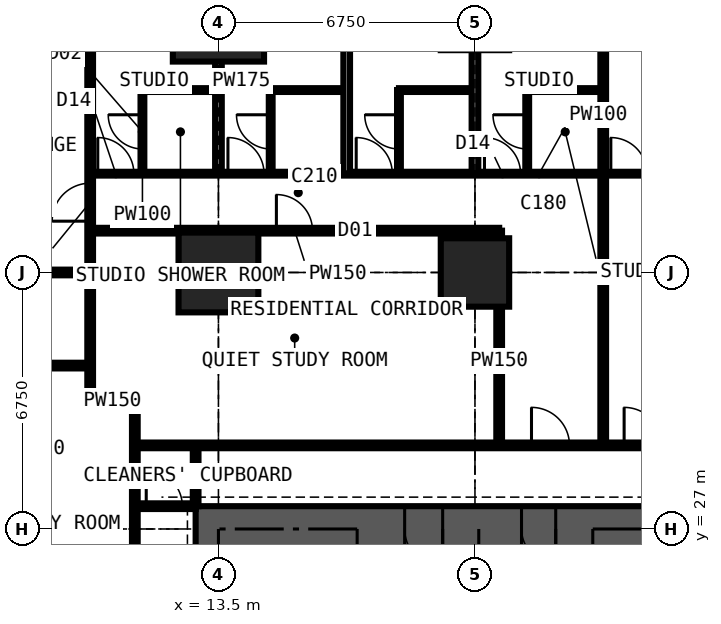
"""IFC4 building model, lengths in metres.
Left out: names, types, materials, properties, quantities, classifications, styles, units other than length and angle.
Written with IfcOpenShell. Run it as: python <this file> out.ifc"""

import sys

from ifc_helpers import new_model, si_unit, direction, frame, frame_2d, origin, origin_2d, place, context, subcontext, project, spatial, rectangle, extrude, element, fill, save


model = new_model("IFC4")
c1 = context("Model", 3, precision=1e-05, world=origin(), true_north=direction((0.0, 1.0)))
c2 = subcontext(c1, "Body", "Model", "MODEL_VIEW")
j1 = project(units=[si_unit("LENGTHUNIT", "METRE"), si_unit("PLANEANGLEUNIT", "RADIAN")], contexts=[c1])
p1 = place(None, origin())
s1 = spatial("IfcSite", under=j1, at=p1, CompositionType="ELEMENT")
p2 = place(p1, origin())
s2 = spatial("IfcBuilding", under=s1, at=p2, CompositionType="ELEMENT")
p3 = place(p2, frame((0.0, 0.0, 72.0)))
s3 = spatial("IfcBuildingStorey", under=s2, at=p3, CompositionType="ELEMENT", Elevation=72.0)
p4 = place(p3, frame((13.5, 33.75, 0.0), z_axis=(0.0, 0.0, 1.0), x_axis=(1.0, 0.0, 0.0)))
e1 = element("IfcColumn", 1, at=p4, inside=s3, PredefinedType="COLUMN", context=c2, shape_type="SweptSolid", body=[
    extrude(rectangle(XDim=2.1, YDim=2.1, at=origin_2d()), origin(), (0.0, 0.0, 1.0), 3.6),
])
p5 = place(p3, frame((13.5, 40.5, 0.0), z_axis=(0.0, 0.0, 1.0), x_axis=(1.0, 0.0, 0.0)))
e2 = element("IfcColumn", 2, at=p5, inside=s3, PredefinedType="COLUMN", context=c2, shape_type="SweptSolid", body=[
    extrude(rectangle(XDim=2.4, YDim=2.4, at=origin_2d()), origin(), (0.0, 0.0, 1.0), 3.6),
])
p6 = place(p3, frame((20.25, 33.75, 0.0), z_axis=(0.0, 0.0, 1.0), x_axis=(1.0, 0.0, 0.0)))
e3 = element("IfcColumn", 3, at=p6, inside=s3, PredefinedType="COLUMN", context=c2, shape_type="SweptSolid", body=[
    extrude(rectangle(XDim=1.8, YDim=1.8, at=origin_2d()), origin(), (0.0, 0.0, 1.0), 3.6),
])
p7 = place(p3, frame((27.6, 27.0, 0.0), z_axis=(0.0, 0.0, 1.0), x_axis=(-1.0, 0.0, 0.0)))
e4 = element("IfcWall", 4, at=p7, inside=s3, PredefinedType="SHEAR", context=c2, shape_type="SweptSolid", body=[
    extrude(rectangle(XDim=14.7, YDim=1.2, at=frame_2d((7.35, 0.0))), origin(), (0.0, 0.0, 1.0), 3.6),
])
p8 = place(p7, frame((5.225, 0.0, 0.0)))
e5 = element("IfcOpeningElement", 5, at=p8, cuts=e4, PredefinedType="OPENING", context=c2, shape_type="SweptSolid", body=[
    extrude(rectangle(XDim=0.9, YDim=2.2, at=frame_2d((0.45, 1.1))), frame((0.0, 0.61, 0.0), z_axis=(0.0, -1.0, 0.0), x_axis=(1.0, 0.0, 0.0)), (0.0, 0.0, 1.0), 1.22),
])
p9 = place(p7, frame((8.2, 0.0, 0.0)))
e6 = element("IfcOpeningElement", 6, at=p9, cuts=e4, PredefinedType="OPENING", context=c2, shape_type="SweptSolid", body=[
    extrude(rectangle(XDim=1.0, YDim=2.2, at=frame_2d((0.5, 1.1))), frame((0.0, 0.61, 0.0), z_axis=(0.0, -1.0, 0.0), x_axis=(1.0, 0.0, 0.0)), (0.0, 0.0, 1.0), 1.22),
])
p10 = place(p3, frame((-0.734, 33.75, 0.0), z_axis=(0.0, 0.0, 1.0), x_axis=(1.0, 0.0, 0.0)))
e7 = element("IfcWall", 7, at=p10, inside=s3, PredefinedType="PARTITIONING", context=c2, shape_type="SweptSolid", body=[
    extrude(rectangle(XDim=10.859, YDim=0.15, at=frame_2d((5.429, 0.0))), origin(), (0.0, 0.0, 1.0), 2.802),
])
p11 = place(p3, frame((5.65, 31.3, 0.0), z_axis=(0.0, 0.0, 1.0), x_axis=(1.0, 0.0, 0.0)))
e8 = element("IfcWall", 8, at=p11, inside=s3, PredefinedType="PARTITIONING", context=c2, shape_type="SweptSolid", body=[
    extrude(rectangle(XDim=4.475, YDim=0.15, at=frame_2d((2.238, 0.0))), origin(), (0.0, 0.0, 1.0), 3.3),
])
p12 = place(p3, frame((10.125, 30.375, 0.0), z_axis=(0.0, 0.0, 1.0), x_axis=(0.0, 1.0, 0.0)))
e9 = element("IfcWall", 9, at=p12, inside=s3, PredefinedType="PARTITIONING", context=c2, shape_type="SweptSolid", body=[
    extrude(rectangle(XDim=10.859, YDim=0.15, at=frame_2d((5.429, 0.0))), origin(), (0.0, 0.0, 1.0), 3.3),
])
p13 = place(p12, frame((4.725, 0.0, 0.0)))
e10 = element("IfcOpeningElement", 10, at=p13, cuts=e9, PredefinedType="OPENING", context=c2, shape_type="SweptSolid", body=[
    extrude(rectangle(XDim=1.0, YDim=2.2, at=frame_2d((0.5, 1.1))), frame((0.0, 0.085, 0.0), z_axis=(0.0, -1.0, 0.0), x_axis=(1.0, 0.0, 0.0)), (0.0, 0.0, 1.0), 0.17),
])
p14 = place(p3, frame((10.125, 30.375, 0.0), z_axis=(0.0, 0.0, 1.0), x_axis=(1.0, 0.0, 0.0)))
e11 = element("IfcWall", 11, at=p14, inside=s3, PredefinedType="PARTITIONING", context=c2, shape_type="SweptSolid", body=[
    extrude(rectangle(XDim=1.175, YDim=0.15, at=frame_2d((0.587, 0.0))), origin(), (0.0, 0.0, 1.0), 3.3),
])
p15 = place(p3, frame((10.125, 34.85, 0.0), z_axis=(0.0, 0.0, 1.0), x_axis=(1.0, 0.0, 0.0)))
e12 = element("IfcWall", 12, at=p15, inside=s3, PredefinedType="PARTITIONING", context=c2, shape_type="SweptSolid", body=[
    extrude(rectangle(XDim=10.762, YDim=0.15, at=frame_2d((5.381, 0.0))), origin(), (0.0, 0.0, 1.0), 3.3),
])
p16 = place(p15, frame((4.9, 0.0, 0.0)))
e13 = element("IfcOpeningElement", 13, at=p16, cuts=e12, PredefinedType="OPENING", context=c2, shape_type="SweptSolid", body=[
    extrude(rectangle(XDim=0.95, YDim=2.2, at=frame_2d((0.475, 1.1))), frame((0.0, 0.085, 0.0), z_axis=(0.0, -1.0, 0.0), x_axis=(1.0, 0.0, 0.0)), (0.0, 0.0, 1.0), 0.17),
])
p17 = place(p3, frame((10.125, 36.35, 0.0), z_axis=(0.0, 0.0, 1.0), x_axis=(1.0, 0.0, 0.0)))
e14 = element("IfcWall", 14, at=p17, inside=s3, PredefinedType="PARTITIONING", context=c2, shape_type="SweptSolid", body=[
    extrude(rectangle(XDim=23.625, YDim=0.1, at=frame_2d((11.812, 0.0))), origin(), (0.0, 0.0, 1.0), 3.3),
])
p18 = place(p17, frame((21.45, 0.0, 0.0)))
e15 = element("IfcOpeningElement", 15, at=p18, cuts=e14, PredefinedType="OPENING", context=c2, shape_type="SweptSolid", body=[
    extrude(rectangle(XDim=1.0, YDim=2.2, at=frame_2d((0.5, 1.1))), frame((0.0, 0.06, 0.0), z_axis=(0.0, -1.0, 0.0), x_axis=(1.0, 0.0, 0.0)), (0.0, 0.0, 1.0), 0.12),
])
p19 = place(p17, frame((17.125, 0.0, 0.0)))
e16 = element("IfcOpeningElement", 16, at=p19, cuts=e14, PredefinedType="OPENING", context=c2, shape_type="SweptSolid", body=[
    extrude(rectangle(XDim=0.95, YDim=2.2, at=frame_2d((0.475, 1.1))), frame((0.0, 0.06, 0.0), z_axis=(0.0, -1.0, 0.0), x_axis=(1.0, 0.0, 0.0)), (0.0, 0.0, 1.0), 0.12),
])
p20 = place(p17, frame((13.7, 0.0, 0.0)))
e17 = element("IfcOpeningElement", 17, at=p20, cuts=e14, PredefinedType="OPENING", context=c2, shape_type="SweptSolid", body=[
    extrude(rectangle(XDim=0.95, YDim=2.2, at=frame_2d((0.475, 1.1))), frame((0.0, 0.06, 0.0), z_axis=(0.0, -1.0, 0.0), x_axis=(1.0, 0.0, 0.0)), (0.0, 0.0, 1.0), 0.12),
])
p21 = place(p17, frame((0.2, 0.0, 0.0)))
e18 = element("IfcOpeningElement", 18, at=p21, cuts=e14, PredefinedType="OPENING", context=c2, shape_type="SweptSolid", body=[
    extrude(rectangle(XDim=0.95, YDim=2.2, at=frame_2d((0.475, 1.1))), frame((0.0, 0.06, 0.0), z_axis=(0.0, -1.0, 0.0), x_axis=(1.0, 0.0, 0.0)), (0.0, 0.0, 1.0), 0.12),
])
p22 = place(p17, frame((3.625, 0.0, 0.0)))
e19 = element("IfcOpeningElement", 19, at=p22, cuts=e14, PredefinedType="OPENING", context=c2, shape_type="SweptSolid", body=[
    extrude(rectangle(XDim=0.95, YDim=2.2, at=frame_2d((0.475, 1.1))), frame((0.0, 0.06, 0.0), z_axis=(0.0, -1.0, 0.0), x_axis=(1.0, 0.0, 0.0)), (0.0, 0.0, 1.0), 0.12),
])
p23 = place(p17, frame((7.0, 0.0, 0.0)))
e20 = element("IfcOpeningElement", 20, at=p23, cuts=e14, PredefinedType="OPENING", context=c2, shape_type="SweptSolid", body=[
    extrude(rectangle(XDim=0.95, YDim=2.2, at=frame_2d((0.475, 1.1))), frame((0.0, 0.06, 0.0), z_axis=(0.0, -1.0, 0.0), x_axis=(1.0, 0.0, 0.0)), (0.0, 0.0, 1.0), 0.12),
])
p24 = place(p17, frame((10.375, 0.0, 0.0)))
e21 = element("IfcOpeningElement", 21, at=p24, cuts=e14, PredefinedType="OPENING", context=c2, shape_type="SweptSolid", body=[
    extrude(rectangle(XDim=0.95, YDim=2.2, at=frame_2d((0.475, 1.1))), frame((0.0, 0.06, 0.0), z_axis=(0.0, -1.0, 0.0), x_axis=(1.0, 0.0, 0.0)), (0.0, 0.0, 1.0), 0.12),
])
p25 = place(p3, frame((11.3, 11.3, 0.0), z_axis=(0.0, 0.0, 1.0), x_axis=(0.0, 1.0, 0.0)))
e22 = element("IfcWall", 22, at=p25, inside=s3, PredefinedType="PARTITIONING", context=c2, shape_type="SweptSolid", body=[
    extrude(rectangle(XDim=19.075, YDim=0.15, at=frame_2d((9.538, 0.0))), origin(), (0.0, 0.0, 1.0), 3.3),
])
p26 = place(p25, frame((10.137, 0.0, 0.0)))
e23 = element("IfcOpeningElement", 23, at=p26, cuts=e22, PredefinedType="OPENING", context=c2, shape_type="SweptSolid", body=[
    extrude(rectangle(XDim=1.0, YDim=2.2, at=frame_2d((0.5, 1.1))), frame((0.0, 0.085, 0.0), z_axis=(0.0, -1.0, 0.0), x_axis=(1.0, 0.0, 0.0)), (0.0, 0.0, 1.0), 0.17),
])
p27 = place(p3, frame((11.3, 27.6, 0.0), z_axis=(0.0, 0.0, 1.0), x_axis=(1.0, 0.0, 0.0)))
e24 = element("IfcWall", 24, at=p27, inside=s3, PredefinedType="PARTITIONING", context=c2, shape_type="SweptSolid", body=[
    extrude(rectangle(XDim=1.6, YDim=0.15, at=frame_2d((0.8, 0.0))), origin(), (0.0, 0.0, 1.0), 2.7),
])
p28 = place(p27, frame((0.3, 0.0, 0.0)))
e25 = element("IfcOpeningElement", 25, at=p28, cuts=e24, PredefinedType="OPENING", context=c2, shape_type="SweptSolid", body=[
    extrude(rectangle(XDim=0.95, YDim=2.2, at=frame_2d((0.475, 1.1))), frame((0.0, 0.085, 0.0), z_axis=(0.0, -1.0, 0.0), x_axis=(1.0, 0.0, 0.0)), (0.0, 0.0, 1.0), 0.17),
])
p29 = place(p3, frame((11.3, 29.2, 0.0), z_axis=(0.0, 0.0, 1.0), x_axis=(1.0, 0.0, 0.0)))
e26 = element("IfcWall", 26, at=p29, inside=s3, PredefinedType="PARTITIONING", context=c2, shape_type="SweptSolid", body=[
    extrude(rectangle(XDim=19.075, YDim=0.15, at=frame_2d((9.538, 0.0))), origin(), (0.0, 0.0, 1.0), 3.3),
])
p30 = place(p29, frame((12.875, 0.0, 0.0)))
e27 = element("IfcOpeningElement", 27, at=p30, cuts=e26, PredefinedType="OPENING", context=c2, shape_type="SweptSolid", body=[
    extrude(rectangle(XDim=1.0, YDim=2.2, at=frame_2d((0.5, 1.1))), frame((0.0, 0.085, 0.0), z_axis=(0.0, -1.0, 0.0), x_axis=(1.0, 0.0, 0.0)), (0.0, 0.0, 1.0), 0.17),
])
p31 = place(p29, frame((10.438, 0.0, 0.0)))
e28 = element("IfcOpeningElement", 28, at=p31, cuts=e26, PredefinedType="OPENING", context=c2, shape_type="SweptSolid", body=[
    extrude(rectangle(XDim=1.0, YDim=2.2, at=frame_2d((0.5, 1.1))), frame((0.0, 0.085, 0.0), z_axis=(0.0, -1.0, 0.0), x_axis=(1.0, 0.0, 0.0)), (0.0, 0.0, 1.0), 0.17),
])
p32 = place(p29, frame((15.675, 0.0, 0.0)))
e29 = element("IfcOpeningElement", 29, at=p32, cuts=e26, PredefinedType="OPENING", context=c2, shape_type="SweptSolid", body=[
    extrude(rectangle(XDim=0.95, YDim=2.2, at=frame_2d((0.475, 1.1))), frame((0.0, 0.085, 0.0), z_axis=(0.0, -1.0, 0.0), x_axis=(1.0, 0.0, 0.0)), (0.0, 0.0, 1.0), 0.17),
])
p33 = place(p3, frame((11.5, 36.35, 0.0), z_axis=(0.0, 0.0, 1.0), x_axis=(0.0, 1.0, 0.0)))
e30 = element("IfcWall", 30, at=p33, inside=s3, PredefinedType="PARTITIONING", context=c2, shape_type="SweptSolid", body=[
    extrude(rectangle(XDim=2.2, YDim=0.1, at=frame_2d((1.1, 0.0))), origin(), (0.0, 0.0, 1.0), 3.3),
])
p34 = place(p33, frame((0.65, 0.0, 0.0)))
e31 = element("IfcOpeningElement", 31, at=p34, cuts=e30, PredefinedType="OPENING", context=c2, shape_type="SweptSolid", body=[
    extrude(rectangle(XDim=0.9, YDim=2.2, at=frame_2d((0.45, 1.1))), frame((0.0, 0.06, 0.0), z_axis=(0.0, -1.0, 0.0), x_axis=(1.0, 0.0, 0.0)), (0.0, 0.0, 1.0), 0.12),
])
p35 = place(p3, frame((11.5, 38.55, 0.0), z_axis=(0.0, 0.0, 1.0), x_axis=(1.0, 0.0, 0.0)))
e32 = element("IfcWall", 32, at=p35, inside=s3, PredefinedType="PARTITIONING", context=c2, shape_type="SweptSolid", body=[
    extrude(rectangle(XDim=2.0, YDim=0.1, at=frame_2d((1.0, 0.0))), origin(), (0.0, 0.0, 1.0), 3.3),
])
p36 = place(p3, frame((12.9, 27.6, 0.0), z_axis=(0.0, 0.0, 1.0), x_axis=(0.0, 1.0, 0.0)))
e33 = element("IfcWall", 33, at=p36, inside=s3, PredefinedType="PARTITIONING", context=c2, shape_type="SweptSolid", body=[
    extrude(rectangle(XDim=1.6, YDim=0.15, at=frame_2d((0.8, 0.0))), origin(), (0.0, 0.0, 1.0), 3.3),
])
p37 = place(p3, frame((13.5, 36.35, 0.0), z_axis=(0.0, 0.0, 1.0), x_axis=(0.0, 1.0, 0.0)))
e34 = element("IfcWall", 34, at=p37, inside=s3, PredefinedType="PARTITIONING", context=c2, shape_type="SweptSolid", body=[
    extrude(rectangle(XDim=4.884, YDim=0.175, at=frame_2d((2.442, 0.0))), origin(), (0.0, 0.0, 1.0), 2.802),
])
p38 = place(p3, frame((14.875, 36.35, 0.0), z_axis=(0.0, 0.0, 1.0), x_axis=(0.0, 1.0, 0.0)))
e35 = element("IfcWall", 35, at=p38, inside=s3, PredefinedType="PARTITIONING", context=c2, shape_type="SweptSolid", body=[
    extrude(rectangle(XDim=2.2, YDim=0.1, at=frame_2d((1.1, 0.0))), origin(), (0.0, 0.0, 1.0), 3.3),
])
p39 = place(p38, frame((0.65, 0.0, 0.0)))
e36 = element("IfcOpeningElement", 36, at=p39, cuts=e35, PredefinedType="OPENING", context=c2, shape_type="SweptSolid", body=[
    extrude(rectangle(XDim=0.9, YDim=2.2, at=frame_2d((0.45, 1.1))), frame((0.0, 0.06, 0.0), z_axis=(0.0, -1.0, 0.0), x_axis=(1.0, 0.0, 0.0)), (0.0, 0.0, 1.0), 0.12),
])
p40 = place(p3, frame((14.875, 38.55, 0.0), z_axis=(0.0, 0.0, 1.0), x_axis=(1.0, 0.0, 0.0)))
e37 = element("IfcWall", 37, at=p40, inside=s3, PredefinedType="PARTITIONING", context=c2, shape_type="SweptSolid", body=[
    extrude(rectangle(XDim=2.0, YDim=0.1, at=frame_2d((1.0, 0.0))), origin(), (0.0, 0.0, 1.0), 3.3),
])
p41 = place(p3, frame((16.875, 36.35, 0.0), z_axis=(0.0, 0.0, 1.0), x_axis=(0.0, 1.0, 0.0)))
e38 = element("IfcWall", 38, at=p41, inside=s3, PredefinedType="PARTITIONING", context=c2, shape_type="SweptSolid", body=[
    extrude(rectangle(XDim=4.884, YDim=0.175, at=frame_2d((2.442, 0.0))), origin(), (0.0, 0.0, 1.0), 3.3),
])
p42 = place(p3, frame((18.25, 36.35, 0.0), z_axis=(0.0, 0.0, 1.0), x_axis=(0.0, 1.0, 0.0)))
e39 = element("IfcWall", 39, at=p42, inside=s3, PredefinedType="PARTITIONING", context=c2, shape_type="SweptSolid", body=[
    extrude(rectangle(XDim=2.2, YDim=0.1, at=frame_2d((1.1, 0.0))), origin(), (0.0, 0.0, 1.0), 3.3),
])
p43 = place(p42, frame((0.65, 0.0, 0.0)))
e40 = element("IfcOpeningElement", 40, at=p43, cuts=e39, PredefinedType="OPENING", context=c2, shape_type="SweptSolid", body=[
    extrude(rectangle(XDim=0.9, YDim=2.2, at=frame_2d((0.45, 1.1))), frame((0.0, 0.06, 0.0), z_axis=(0.0, -1.0, 0.0), x_axis=(1.0, 0.0, 0.0)), (0.0, 0.0, 1.0), 0.12),
])
p44 = place(p3, frame((18.25, 38.55, 0.0), z_axis=(0.0, 0.0, 1.0), x_axis=(1.0, 0.0, 0.0)))
e41 = element("IfcWall", 41, at=p44, inside=s3, PredefinedType="PARTITIONING", context=c2, shape_type="SweptSolid", body=[
    extrude(rectangle(XDim=2.0, YDim=0.1, at=frame_2d((1.0, 0.0))), origin(), (0.0, 0.0, 1.0), 3.3),
])
p45 = place(p3, frame((20.25, 36.35, 0.0), z_axis=(0.0, 0.0, 1.0), x_axis=(0.0, 1.0, 0.0)))
e42 = element("IfcWall", 42, at=p45, inside=s3, PredefinedType="PARTITIONING", context=c2, shape_type="SweptSolid", body=[
    extrude(rectangle(XDim=4.884, YDim=0.175, at=frame_2d((2.442, 0.0))), origin(), (0.0, 0.0, 1.0), 2.731),
])
p46 = place(p3, frame((20.887, 29.2, 0.0), z_axis=(0.0, 0.0, 1.0), x_axis=(0.0, 1.0, 0.0)))
e43 = element("IfcWall", 43, at=p46, inside=s3, PredefinedType="PARTITIONING", context=c2, shape_type="SweptSolid", body=[
    extrude(rectangle(XDim=5.65, YDim=0.15, at=frame_2d((2.825, 0.0))), origin(), (0.0, 0.0, 1.0), 3.3),
])
p47 = place(p3, frame((21.625, 36.35, 0.0), z_axis=(0.0, 0.0, 1.0), x_axis=(0.0, 1.0, 0.0)))
e44 = element("IfcWall", 44, at=p47, inside=s3, PredefinedType="PARTITIONING", context=c2, shape_type="SweptSolid", body=[
    extrude(rectangle(XDim=2.2, YDim=0.1, at=frame_2d((1.1, 0.0))), origin(), (0.0, 0.0, 1.0), 3.3),
])
p48 = place(p47, frame((0.65, 0.0, 0.0)))
e45 = element("IfcOpeningElement", 45, at=p48, cuts=e44, PredefinedType="OPENING", context=c2, shape_type="SweptSolid", body=[
    extrude(rectangle(XDim=0.9, YDim=2.2, at=frame_2d((0.45, 1.1))), frame((0.0, 0.06, 0.0), z_axis=(0.0, -1.0, 0.0), x_axis=(1.0, 0.0, 0.0)), (0.0, 0.0, 1.0), 0.12),
])
p49 = place(p3, frame((21.625, 38.55, 0.0), z_axis=(0.0, 0.0, 1.0), x_axis=(1.0, 0.0, 0.0)))
e46 = element("IfcWall", 46, at=p49, inside=s3, PredefinedType="PARTITIONING", context=c2, shape_type="SweptSolid", body=[
    extrude(rectangle(XDim=2.0, YDim=0.1, at=frame_2d((1.0, 0.0))), origin(), (0.0, 0.0, 1.0), 3.3),
])
p50 = place(p3, frame((23.625, 29.2, 0.0), z_axis=(0.0, 0.0, 1.0), x_axis=(0.0, 1.0, 0.0)))
e47 = element("IfcWall", 47, at=p50, inside=s3, PredefinedType="PARTITIONING", context=c2, shape_type="SweptSolid", body=[
    extrude(rectangle(XDim=12.034, YDim=0.15, at=frame_2d((6.017, 0.0))), origin(), (0.0, 0.0, 1.0), 3.3),
])
p51 = place(p8, origin())
e48 = element("IfcDoor", 48, at=p51, inside=s3, OperationType="SINGLE_SWING_LEFT", PredefinedType="DOOR", context=c2, shape_type="SweptSolid", body=[
    extrude(rectangle(XDim=0.9, YDim=2.2, at=frame_2d((0.45, 1.1))), frame((0.0, 0.4, 0.0), z_axis=(0.0, -1.0, 0.0), x_axis=(1.0, 0.0, 0.0)), (0.0, 0.0, 1.0), 0.8),
])
fill(e5, e48)
p52 = place(p9, origin())
e49 = element("IfcDoor", 49, at=p52, inside=s3, OperationType="SINGLE_SWING_LEFT", PredefinedType="DOOR", context=c2, shape_type="SweptSolid", body=[
    extrude(rectangle(XDim=1.0, YDim=2.2, at=frame_2d((0.5, 1.1))), frame((0.0, 0.025, 0.0), z_axis=(0.0, -1.0, 0.0), x_axis=(1.0, 0.0, 0.0)), (0.0, 0.0, 1.0), 0.05),
])
fill(e6, e49)
p53 = place(p28, origin())
e50 = element("IfcDoor", 50, at=p53, inside=s3, OperationType="SINGLE_SWING_LEFT", PredefinedType="DOOR", context=c2, shape_type="SweptSolid", body=[
    extrude(rectangle(XDim=0.95, YDim=2.2, at=frame_2d((0.475, 1.1))), frame((0.0, 0.025, 0.0), z_axis=(0.0, -1.0, 0.0), x_axis=(1.0, 0.0, 0.0)), (0.0, 0.0, 1.0), 0.05),
])
fill(e25, e50)
p54 = place(p20, origin())
e51 = element("IfcDoor", 51, at=p54, inside=s3, OperationType="SINGLE_SWING_LEFT", PredefinedType="DOOR", context=c2, shape_type="SweptSolid", body=[
    extrude(rectangle(XDim=0.95, YDim=2.2, at=frame_2d((0.475, 1.1))), frame((0.0, 0.025, 0.0), z_axis=(0.0, -1.0, 0.0), x_axis=(1.0, 0.0, 0.0)), (0.0, 0.0, 1.0), 0.05),
])
fill(e17, e51)
p55 = place(p30, origin())
e52 = element("IfcDoor", 52, at=p55, inside=s3, OperationType="SINGLE_SWING_LEFT", PredefinedType="DOOR", context=c2, shape_type="SweptSolid", body=[
    extrude(rectangle(XDim=1.0, YDim=2.2, at=frame_2d((0.5, 1.1))), frame((0.0, 0.025, 0.0), z_axis=(0.0, -1.0, 0.0), x_axis=(1.0, 0.0, 0.0)), (0.0, 0.0, 1.0), 0.05),
])
fill(e27, e52)
p56 = place(p21, origin())
e53 = element("IfcDoor", 53, at=p56, inside=s3, OperationType="SINGLE_SWING_LEFT", PredefinedType="DOOR", context=c2, shape_type="SweptSolid", body=[
    extrude(rectangle(XDim=0.95, YDim=2.2, at=frame_2d((0.475, 1.1))), frame((0.0, 0.025, 0.0), z_axis=(0.0, -1.0, 0.0), x_axis=(1.0, 0.0, 0.0)), (0.0, 0.0, 1.0), 0.05),
])
fill(e18, e53)
p57 = place(p34, origin())
e54 = element("IfcDoor", 54, at=p57, inside=s3, OperationType="SINGLE_SWING_RIGHT", PredefinedType="DOOR", context=c2, shape_type="SweptSolid", body=[
    extrude(rectangle(XDim=0.9, YDim=2.2, at=frame_2d((0.45, 1.1))), frame((0.0, 0.025, 0.0), z_axis=(0.0, -1.0, 0.0), x_axis=(1.0, 0.0, 0.0)), (0.0, 0.0, 1.0), 0.05),
])
fill(e31, e54)
p58 = place(p22, origin())
e55 = element("IfcDoor", 55, at=p58, inside=s3, OperationType="SINGLE_SWING_LEFT", PredefinedType="DOOR", context=c2, shape_type="SweptSolid", body=[
    extrude(rectangle(XDim=0.95, YDim=2.2, at=frame_2d((0.475, 1.1))), frame((0.0, 0.025, 0.0), z_axis=(0.0, -1.0, 0.0), x_axis=(1.0, 0.0, 0.0)), (0.0, 0.0, 1.0), 0.05),
])
fill(e19, e55)
p59 = place(p39, origin())
e56 = element("IfcDoor", 56, at=p59, inside=s3, OperationType="SINGLE_SWING_RIGHT", PredefinedType="DOOR", context=c2, shape_type="SweptSolid", body=[
    extrude(rectangle(XDim=0.9, YDim=2.2, at=frame_2d((0.45, 1.1))), frame((0.0, 0.025, 0.0), z_axis=(0.0, -1.0, 0.0), x_axis=(1.0, 0.0, 0.0)), (0.0, 0.0, 1.0), 0.05),
])
fill(e36, e56)
p60 = place(p23, origin())
e57 = element("IfcDoor", 57, at=p60, inside=s3, OperationType="SINGLE_SWING_LEFT", PredefinedType="DOOR", context=c2, shape_type="SweptSolid", body=[
    extrude(rectangle(XDim=0.95, YDim=2.2, at=frame_2d((0.475, 1.1))), frame((0.0, 0.025, 0.0), z_axis=(0.0, -1.0, 0.0), x_axis=(1.0, 0.0, 0.0)), (0.0, 0.0, 1.0), 0.05),
])
fill(e20, e57)
p61 = place(p43, origin())
e58 = element("IfcDoor", 58, at=p61, inside=s3, OperationType="SINGLE_SWING_RIGHT", PredefinedType="DOOR", context=c2, shape_type="SweptSolid", body=[
    extrude(rectangle(XDim=0.9, YDim=2.2, at=frame_2d((0.45, 1.1))), frame((0.0, 0.025, 0.0), z_axis=(0.0, -1.0, 0.0), x_axis=(1.0, 0.0, 0.0)), (0.0, 0.0, 1.0), 0.05),
])
fill(e40, e58)
p62 = place(p24, origin())
e59 = element("IfcDoor", 59, at=p62, inside=s3, OperationType="SINGLE_SWING_LEFT", PredefinedType="DOOR", context=c2, shape_type="SweptSolid", body=[
    extrude(rectangle(XDim=0.95, YDim=2.2, at=frame_2d((0.475, 1.1))), frame((0.0, 0.025, 0.0), z_axis=(0.0, -1.0, 0.0), x_axis=(1.0, 0.0, 0.0)), (0.0, 0.0, 1.0), 0.05),
])
fill(e21, e59)
p63 = place(p48, origin())
e60 = element("IfcDoor", 60, at=p63, inside=s3, OperationType="SINGLE_SWING_RIGHT", PredefinedType="DOOR", context=c2, shape_type="SweptSolid", body=[
    extrude(rectangle(XDim=0.9, YDim=2.2, at=frame_2d((0.45, 1.1))), frame((0.0, 0.025, 0.0), z_axis=(0.0, -1.0, 0.0), x_axis=(1.0, 0.0, 0.0)), (0.0, 0.0, 1.0), 0.05),
])
fill(e45, e60)
p64 = place(p31, origin())
e61 = element("IfcDoor", 61, at=p64, inside=s3, OperationType="SINGLE_SWING_LEFT", PredefinedType="DOOR", context=c2, shape_type="SweptSolid", body=[
    extrude(rectangle(XDim=1.0, YDim=2.2, at=frame_2d((0.5, 1.1))), frame((0.0, 0.025, 0.0), z_axis=(0.0, -1.0, 0.0), x_axis=(1.0, 0.0, 0.0)), (0.0, 0.0, 1.0), 0.05),
])
fill(e28, e61)
p65 = place(p16, origin())
e62 = element("IfcDoor", 62, at=p65, inside=s3, OperationType="SINGLE_SWING_LEFT", PredefinedType="DOOR", context=c2, shape_type="SweptSolid", body=[
    extrude(rectangle(XDim=0.95, YDim=2.2, at=frame_2d((0.475, 1.1))), frame((0.0, 0.025, 0.0), z_axis=(0.0, -1.0, 0.0), x_axis=(1.0, 0.0, 0.0)), (0.0, 0.0, 1.0), 0.05),
])
fill(e13, e62)
p66 = place(p13, origin())
e63 = element("IfcDoor", 63, at=p66, inside=s3, OperationType="SINGLE_SWING_LEFT", PredefinedType="DOOR", context=c2, shape_type="SweptSolid", body=[
    extrude(rectangle(XDim=1.0, YDim=2.2, at=frame_2d((0.5, 1.1))), frame((0.0, 0.025, 0.0), z_axis=(0.0, -1.0, 0.0), x_axis=(1.0, 0.0, 0.0)), (0.0, 0.0, 1.0), 0.05),
])
fill(e10, e63)
save(model, sys.argv[1])
